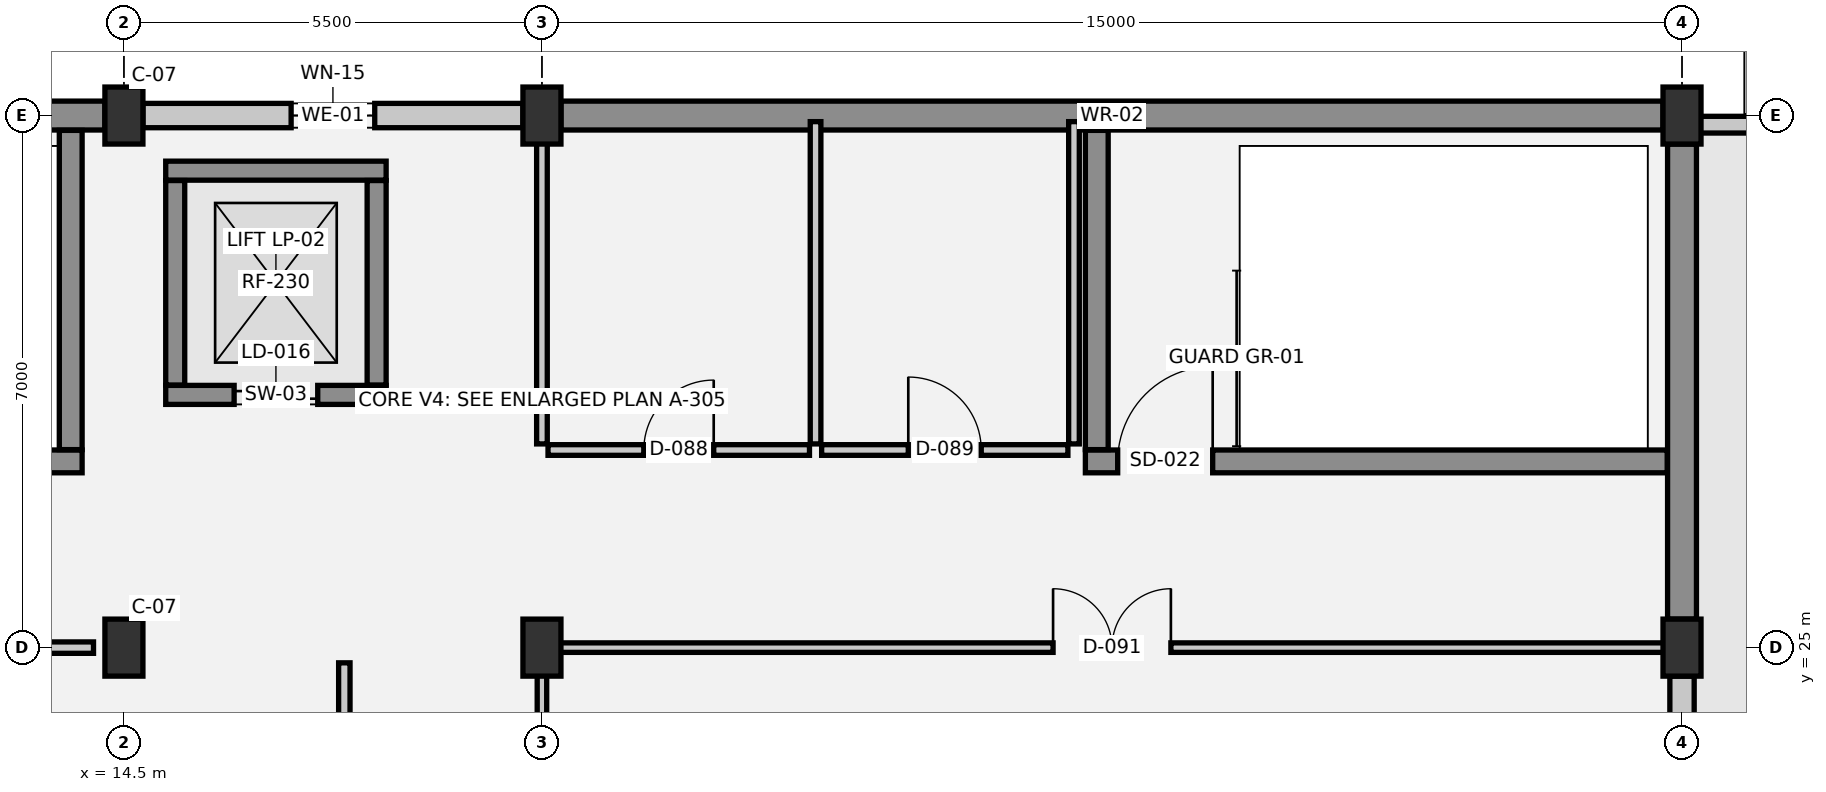
"""IFC4 building model, lengths in metres.
Left out: names, types, materials, properties, quantities, classifications, styles, units other than length and angle.
Written with IfcOpenShell. Run it as: python <this file> out.ifc"""

import sys

from ifc_helpers import new_model, si_unit, direction, frame, frame_2d, origin, origin_2d, place, context, subcontext, project, spatial, rectangle, extrude, element, fill, save


model = new_model("IFC4")
c1 = context("Model", 3, precision=1e-05, world=origin(), true_north=direction((0.0, 1.0)))
c2 = subcontext(c1, "Body", "Model", "MODEL_VIEW")
j1 = project(units=[si_unit("LENGTHUNIT", "METRE"), si_unit("PLANEANGLEUNIT", "RADIAN")], contexts=[c1])
p1 = place(None, origin())
s1 = spatial("IfcSite", under=j1, at=p1, CompositionType="ELEMENT")
p2 = place(p1, origin())
s2 = spatial("IfcBuilding", under=s1, at=p2, CompositionType="ELEMENT")
p3 = place(p2, frame((0.0, 0.0, 18.3)))
s3 = spatial("IfcBuildingStorey", under=s2, at=p3, CompositionType="ELEMENT", Elevation=18.3)
for number, where, z_axis, x_axis in (
    (1, (14.5, 25.0, 0.0), (0.0, 0.0, 1.0), (1.0, 0.0, 0.0)),
    (2, (14.5, 32.0, 0.0), (0.0, 0.0, 1.0), (1.0, 0.0, 0.0)),
    (3, (20.0, 25.0, 0.0), (0.0, 0.0, 1.0), (1.0, 0.0, 0.0)),
    (4, (20.0, 32.0, 0.0), (0.0, 0.0, 1.0), (1.0, 0.0, 0.0)),
    (5, (35.0, 25.0, 0.0), (0.0, 0.0, 1.0), (1.0, 0.0, 0.0)),
    (6, (35.0, 32.0, 0.0), (0.0, 0.0, 1.0), (1.0, 0.0, 0.0)),
):
    element("IfcColumn", number, at=place(p3, frame(where, z_axis=z_axis, x_axis=x_axis)), inside=s3, PredefinedType="COLUMN", context=c2, shape_type="SweptSolid", body=[
        extrude(rectangle(XDim=0.5, YDim=0.75, at=origin_2d()), origin(), (0.0, 0.0, 1.0), 3.75),
    ])
p4 = place(p3, frame((6.25, 32.0, 0.0), z_axis=(0.0, 0.0, 1.0), x_axis=(1.0, 0.0, 0.0)))
e7 = element("IfcWall", 7, at=p4, inside=s3, PredefinedType="STANDARD", context=c2, shape_type="SweptSolid", body=[
    extrude(rectangle(XDim=8.0, YDim=0.38, at=frame_2d((4.0, 0.0))), origin(), (0.0, 0.0, 1.0), 2.35),
])
p5 = place(p3, frame((14.75, 32.0, 0.0), z_axis=(0.0, 0.0, 1.0), x_axis=(1.0, 0.0, 0.0)))
e8 = element("IfcWall", 8, at=p5, inside=s3, PredefinedType="SOLIDWALL", context=c2, shape_type="SweptSolid", body=[
    extrude(rectangle(XDim=5.0, YDim=0.32, at=frame_2d((2.5, 0.0))), origin(), (0.0, 0.0, 1.0), 2.35),
])
p6 = place(p5, frame((1.95, 0.0, 0.9)))
e9 = element("IfcOpeningElement", 9, at=p6, cuts=e8, PredefinedType="OPENING", context=c2, shape_type="SweptSolid", body=[
    extrude(rectangle(XDim=1.1, YDim=1.2, at=frame_2d((0.55, 0.6))), frame((0.0, 0.17, 0.0), z_axis=(0.0, -1.0, 0.0), x_axis=(1.0, 0.0, 0.0)), (0.0, 0.0, 1.0), 0.34),
])
p7 = place(p3, frame((20.25, 32.0, 0.0), z_axis=(0.0, 0.0, 1.0), x_axis=(1.0, 0.0, 0.0)))
e10 = element("IfcWall", 10, at=p7, inside=s3, PredefinedType="STANDARD", context=c2, shape_type="SweptSolid", body=[
    extrude(rectangle(XDim=14.5, YDim=0.38, at=frame_2d((7.25, 0.0))), origin(), (0.0, 0.0, 1.0), 2.35),
])
p8 = place(p3, frame((35.0, 31.625, 0.0), z_axis=(0.0, 0.0, 1.0), x_axis=(0.0, -1.0, 0.0)))
e11 = element("IfcWall", 11, at=p8, inside=s3, PredefinedType="STANDARD", context=c2, shape_type="SweptSolid", body=[
    extrude(rectangle(XDim=6.25, YDim=0.38, at=frame_2d((3.125, 0.0))), origin(), (0.0, 0.0, 1.0), 2.35),
])
p9 = place(p3, frame((35.0, 24.625, 0.0), z_axis=(0.0, 0.0, 1.0), x_axis=(0.0, -1.0, 0.0)))
e12 = element("IfcWall", 12, at=p9, inside=s3, PredefinedType="SOLIDWALL", context=c2, shape_type="SweptSolid", body=[
    extrude(rectangle(XDim=7.225, YDim=0.32, at=frame_2d((3.613, 0.0))), origin(), (0.0, 0.0, 1.0), 2.35),
])
p10 = place(p9, frame((3.062, 0.0, 0.9)))
e13 = element("IfcOpeningElement", 13, at=p10, cuts=e12, PredefinedType="OPENING", context=c2, shape_type="SweptSolid", body=[
    extrude(rectangle(XDim=1.1, YDim=1.2, at=frame_2d((0.55, 0.6))), frame((0.0, 0.17, 0.0), z_axis=(0.0, -1.0, 0.0), x_axis=(1.0, 0.0, 0.0)), (0.0, 0.0, 1.0), 0.34),
])
p11 = place(p3, frame((35.23, 31.88, 0.0), z_axis=(0.0, 0.0, 1.0), x_axis=(1.0, 0.0, 0.0)))
e14 = element("IfcWall", 14, at=p11, inside=s3, PredefinedType="PARAPET", context=c2, shape_type="SweptSolid", body=[
    extrude(rectangle(XDim=20.54, YDim=0.22, at=frame_2d((10.27, 0.0))), origin(), (0.0, 0.0, 1.0), 0.9),
])
p12 = place(p3, frame((15.05, 28.325, 0.0), z_axis=(0.0, 0.0, 1.0), x_axis=(1.0, 0.0, 0.0)))
e15 = element("IfcWall", 15, at=p12, inside=s3, PredefinedType="SHEAR", context=c2, shape_type="SweptSolid", body=[
    extrude(rectangle(XDim=2.9, YDim=0.25, at=frame_2d((1.45, 0.0))), origin(), (0.0, 0.0, 1.0), 3.12),
])
p13 = place(p12, frame((0.9, 0.0, 0.0)))
e16 = element("IfcOpeningElement", 16, at=p13, cuts=e15, PredefinedType="OPENING", context=c2, shape_type="SweptSolid", body=[
    extrude(rectangle(XDim=1.1, YDim=2.15, at=frame_2d((0.55, 1.075))), frame((0.0, 0.135, 0.0), z_axis=(0.0, -1.0, 0.0), x_axis=(1.0, 0.0, 0.0)), (0.0, 0.0, 1.0), 0.27),
])
p14 = place(p3, frame((17.95, 31.275, 0.0), z_axis=(0.0, 0.0, 1.0), x_axis=(-1.0, 0.0, 0.0)))
e17 = element("IfcWall", 17, at=p14, inside=s3, PredefinedType="SHEAR", context=c2, shape_type="SweptSolid", body=[
    extrude(rectangle(XDim=2.9, YDim=0.25, at=frame_2d((1.45, 0.0))), origin(), (0.0, 0.0, 1.0), 3.12),
])
for number, where, z_axis, x_axis in (
    (18, (15.175, 31.145, 0.0), (0.0, 0.0, 1.0), (0.0, -1.0, 0.0)),
    (19, (17.825, 28.455, 0.0), (0.0, 0.0, 1.0), (0.0, 1.0, 0.0)),
):
    element("IfcWall", number, at=place(p3, frame(where, z_axis=z_axis, x_axis=x_axis)), inside=s3, PredefinedType="SHEAR", context=c2, shape_type="SweptSolid", body=[
        extrude(rectangle(XDim=2.69, YDim=0.25, at=frame_2d((1.345, 0.0))), origin(), (0.0, 0.0, 1.0), 3.12),
    ])
p15 = place(p3, frame((6.25, 27.45, 0.0), z_axis=(0.0, 0.0, 1.0), x_axis=(1.0, 0.0, 0.0)))
e20 = element("IfcWall", 20, at=p15, inside=s3, PredefinedType="SHEAR", context=c2, shape_type="SweptSolid", body=[
    extrude(rectangle(XDim=7.7, YDim=0.3, at=frame_2d((3.85, 0.0))), origin(), (0.0, 0.0, 1.0), 3.47),
])
p16 = place(p15, frame((0.425, 0.0, 0.0)))
e21 = element("IfcOpeningElement", 21, at=p16, cuts=e20, PredefinedType="OPENING", context=c2, shape_type="SweptSolid", body=[
    extrude(rectangle(XDim=1.25, YDim=2.15, at=frame_2d((0.625, 1.075))), frame((0.0, 0.16, 0.0), z_axis=(0.0, -1.0, 0.0), x_axis=(1.0, 0.0, 0.0)), (0.0, 0.0, 1.0), 0.32),
])
p17 = place(p3, frame((13.8, 27.605, 0.0), z_axis=(0.0, 0.0, 1.0), x_axis=(0.0, 1.0, 0.0)))
e22 = element("IfcWall", 22, at=p17, inside=s3, PredefinedType="SHEAR", context=c2, shape_type="SweptSolid", body=[
    extrude(rectangle(XDim=4.2, YDim=0.3, at=frame_2d((2.1, 0.0))), origin(), (0.0, 0.0, 1.0), 3.47),
])
p18 = place(p3, frame((27.15, 27.45, 0.0), z_axis=(0.0, 0.0, 1.0), x_axis=(1.0, 0.0, 0.0)))
e23 = element("IfcWall", 23, at=p18, inside=s3, PredefinedType="SHEAR", context=c2, shape_type="SweptSolid", body=[
    extrude(rectangle(XDim=7.655, YDim=0.3, at=frame_2d((3.828, 0.0))), origin(), (0.0, 0.0, 1.0), 3.47),
])
p19 = place(p18, frame((0.425, 0.0, 0.0)))
e24 = element("IfcOpeningElement", 24, at=p19, cuts=e23, PredefinedType="OPENING", context=c2, shape_type="SweptSolid", body=[
    extrude(rectangle(XDim=1.25, YDim=2.15, at=frame_2d((0.625, 1.075))), frame((0.0, 0.16, 0.0), z_axis=(0.0, -1.0, 0.0), x_axis=(1.0, 0.0, 0.0)), (0.0, 0.0, 1.0), 0.32),
])
p20 = place(p3, frame((27.3, 31.805, 0.0), z_axis=(0.0, 0.0, 1.0), x_axis=(0.0, -1.0, 0.0)))
e25 = element("IfcWall", 25, at=p20, inside=s3, PredefinedType="SHEAR", context=c2, shape_type="SweptSolid", body=[
    extrude(rectangle(XDim=4.2, YDim=0.3, at=frame_2d((2.1, 0.0))), origin(), (0.0, 0.0, 1.0), 3.47),
])
p21 = place(p3, frame((6.08, 25.0, 0.0), z_axis=(0.0, 0.0, 1.0), x_axis=(1.0, 0.0, 0.0)))
e26 = element("IfcWall", 26, at=p21, inside=s3, PredefinedType="PARTITIONING", context=c2, shape_type="SweptSolid", body=[
    extrude(rectangle(XDim=8.02, YDim=0.15, at=frame_2d((4.01, 0.0))), origin(), (0.0, 0.0, 1.0), 2.77),
])
p22 = place(p3, frame((20.08, 25.0, 0.0), z_axis=(0.0, 0.0, 1.0), x_axis=(1.0, 0.0, 0.0)))
e27 = element("IfcWall", 27, at=p22, inside=s3, PredefinedType="PARTITIONING", context=c2, shape_type="SweptSolid", body=[
    extrude(rectangle(XDim=14.84, YDim=0.125, at=frame_2d((7.42, 0.0))), origin(), (0.0, 0.0, 1.0), 2.52),
])
p23 = place(p22, frame((6.645, 0.0, 0.0)))
e28 = element("IfcOpeningElement", 28, at=p23, cuts=e27, PredefinedType="OPENING", context=c2, shape_type="SweptSolid", body=[
    extrude(rectangle(XDim=1.55, YDim=2.25, at=frame_2d((0.775, 1.125))), frame((0.0, 0.073, 0.0), z_axis=(0.0, -1.0, 0.0), x_axis=(1.0, 0.0, 0.0)), (0.0, 0.0, 1.0), 0.145),
])
p24 = place(p3, frame((20.08, 27.6, 0.0), z_axis=(0.0, 0.0, 1.0), x_axis=(1.0, 0.0, 0.0)))
e29 = element("IfcWall", 29, at=p24, inside=s3, PredefinedType="PLUMBINGWALL", context=c2, shape_type="SweptSolid", body=[
    extrude(rectangle(XDim=3.44, YDim=0.14, at=frame_2d((1.72, 0.0))), origin(), (0.0, 0.0, 1.0), 3.39),
])
p25 = place(p24, frame((1.26, 0.0, 0.0)))
e30 = element("IfcOpeningElement", 30, at=p25, cuts=e29, PredefinedType="OPENING", context=c2, shape_type="SweptSolid", body=[
    extrude(rectangle(XDim=0.92, YDim=2.1, at=frame_2d((0.46, 1.05))), frame((0.0, 0.08, 0.0), z_axis=(0.0, -1.0, 0.0), x_axis=(1.0, 0.0, 0.0)), (0.0, 0.0, 1.0), 0.16),
])
p26 = place(p3, frame((23.68, 27.6, 0.0), z_axis=(0.0, 0.0, 1.0), x_axis=(1.0, 0.0, 0.0)))
e31 = element("IfcWall", 31, at=p26, inside=s3, PredefinedType="PLUMBINGWALL", context=c2, shape_type="SweptSolid", body=[
    extrude(rectangle(XDim=3.24, YDim=0.14, at=frame_2d((1.62, 0.0))), origin(), (0.0, 0.0, 1.0), 3.39),
])
p27 = place(p26, frame((1.14, 0.0, 0.0)))
e32 = element("IfcOpeningElement", 32, at=p27, cuts=e31, PredefinedType="OPENING", context=c2, shape_type="SweptSolid", body=[
    extrude(rectangle(XDim=0.96, YDim=2.1, at=frame_2d((0.48, 1.05))), frame((0.0, 0.08, 0.0), z_axis=(0.0, -1.0, 0.0), x_axis=(1.0, 0.0, 0.0)), (0.0, 0.0, 1.0), 0.16),
])
p28 = place(p3, frame((17.4, 10.08, 0.0), z_axis=(0.0, 0.0, 1.0), x_axis=(0.0, 1.0, 0.0)))
e33 = element("IfcWall", 33, at=p28, inside=s3, PredefinedType="PARTITIONING", context=c2, shape_type="SweptSolid", body=[
    extrude(rectangle(XDim=14.72, YDim=0.15, at=frame_2d((7.36, 0.0))), origin(), (0.0, 0.0, 1.0), 3.39),
])
p29 = place(p28, frame((6.61, 0.0, 0.0)))
e34 = element("IfcOpeningElement", 34, at=p29, cuts=e33, PredefinedType="OPENING", context=c2, shape_type="SweptSolid", body=[
    extrude(rectangle(XDim=1.5, YDim=2.25, at=frame_2d((0.75, 1.125))), frame((0.0, 0.085, 0.0), z_axis=(0.0, -1.0, 0.0), x_axis=(1.0, 0.0, 0.0)), (0.0, 0.0, 1.0), 0.17),
])
p30 = place(p3, frame((20.0, 16.625, 0.0), z_axis=(0.0, 0.0, 1.0), x_axis=(0.0, 1.0, 0.0)))
e35 = element("IfcWall", 35, at=p30, inside=s3, PredefinedType="PARTITIONING", context=c2, shape_type="SweptSolid", body=[
    extrude(rectangle(XDim=8.295, YDim=0.125, at=frame_2d((4.147, 0.0))), origin(), (0.0, 0.0, 1.0), 2.77),
])
p31 = place(p3, frame((20.0, 27.68, 0.0), z_axis=(0.0, 0.0, 1.0), x_axis=(0.0, 1.0, 0.0)))
e36 = element("IfcWall", 36, at=p31, inside=s3, PredefinedType="PLUMBINGWALL", context=c2, shape_type="SweptSolid", body=[
    extrude(rectangle(XDim=4.24, YDim=0.14, at=frame_2d((2.12, 0.0))), origin(), (0.0, 0.0, 1.0), 2.995),
])
for number, where, z_axis, x_axis in (
    (37, (23.6, 27.68, 0.0), (0.0, 0.0, 1.0), (0.0, 1.0, 0.0)),
    (38, (27.0, 27.68, 0.0), (0.0, 0.0, 1.0), (0.0, 1.0, 0.0)),
):
    element("IfcWall", number, at=place(p3, frame(where, z_axis=z_axis, x_axis=x_axis)), inside=s3, PredefinedType="PLUMBINGWALL", context=c2, shape_type="SweptSolid", body=[
        extrude(rectangle(XDim=4.24, YDim=0.14, at=frame_2d((2.12, 0.0))), origin(), (0.0, 0.0, 1.0), 3.39),
    ])
p32 = place(p6, origin())
e39 = element("IfcWindow", 39, at=p32, inside=s3, PartitioningType="SINGLE_PANEL", PredefinedType="WINDOW", context=c2, shape_type="SweptSolid", body=[
    extrude(rectangle(XDim=1.1, YDim=1.2, at=frame_2d((0.55, 0.6))), frame((0.0, 0.03, 0.0), z_axis=(0.0, -1.0, 0.0), x_axis=(1.0, 0.0, 0.0)), (0.0, 0.0, 1.0), 0.06),
])
fill(e9, e39)
p33 = place(p13, origin())
e40 = element("IfcDoor", 40, at=p33, inside=s3, OperationType="DOUBLE_DOOR_SLIDING", PredefinedType="DOOR", context=c2, shape_type="SweptSolid", body=[
    extrude(rectangle(XDim=1.1, YDim=2.15, at=frame_2d((0.55, 1.075))), frame((0.0, 0.025, 0.0), z_axis=(0.0, -1.0, 0.0), x_axis=(1.0, 0.0, 0.0)), (0.0, 0.0, 1.0), 0.05),
])
fill(e16, e40)
p34 = place(p19, origin())
e41 = element("IfcDoor", 41, at=p34, inside=s3, OperationType="SINGLE_SWING_RIGHT", PredefinedType="DOOR", context=c2, shape_type="SweptSolid", body=[
    extrude(rectangle(XDim=1.25, YDim=2.15, at=frame_2d((0.625, 1.075))), frame((0.0, 0.025, 0.0), z_axis=(0.0, -1.0, 0.0), x_axis=(1.0, 0.0, 0.0)), (0.0, 0.0, 1.0), 0.05),
])
fill(e24, e41)
p35 = place(p25, origin())
e42 = element("IfcDoor", 42, at=p35, inside=s3, OperationType="SINGLE_SWING_RIGHT", PredefinedType="DOOR", context=c2, shape_type="SweptSolid", body=[
    extrude(rectangle(XDim=0.92, YDim=2.1, at=frame_2d((0.46, 1.05))), frame((0.0, 0.025, 0.0), z_axis=(0.0, -1.0, 0.0), x_axis=(1.0, 0.0, 0.0)), (0.0, 0.0, 1.0), 0.05),
])
fill(e30, e42)
p36 = place(p27, origin())
e43 = element("IfcDoor", 43, at=p36, inside=s3, OperationType="SINGLE_SWING_LEFT", PredefinedType="DOOR", context=c2, shape_type="SweptSolid", body=[
    extrude(rectangle(XDim=0.96, YDim=2.1, at=frame_2d((0.48, 1.05))), frame((0.0, 0.025, 0.0), z_axis=(0.0, -1.0, 0.0), x_axis=(1.0, 0.0, 0.0)), (0.0, 0.0, 1.0), 0.05),
])
fill(e32, e43)
p37 = place(p23, origin())
e44 = element("IfcDoor", 44, at=p37, inside=s3, OperationType="DOUBLE_DOOR_SINGLE_SWING", PredefinedType="DOOR", context=c2, shape_type="SweptSolid", body=[
    extrude(rectangle(XDim=1.55, YDim=2.25, at=frame_2d((0.775, 1.125))), frame((0.0, 0.025, 0.0), z_axis=(0.0, -1.0, 0.0), x_axis=(1.0, 0.0, 0.0)), (0.0, 0.0, 1.0), 0.05),
])
fill(e28, e44)
save(model, sys.argv[1])
